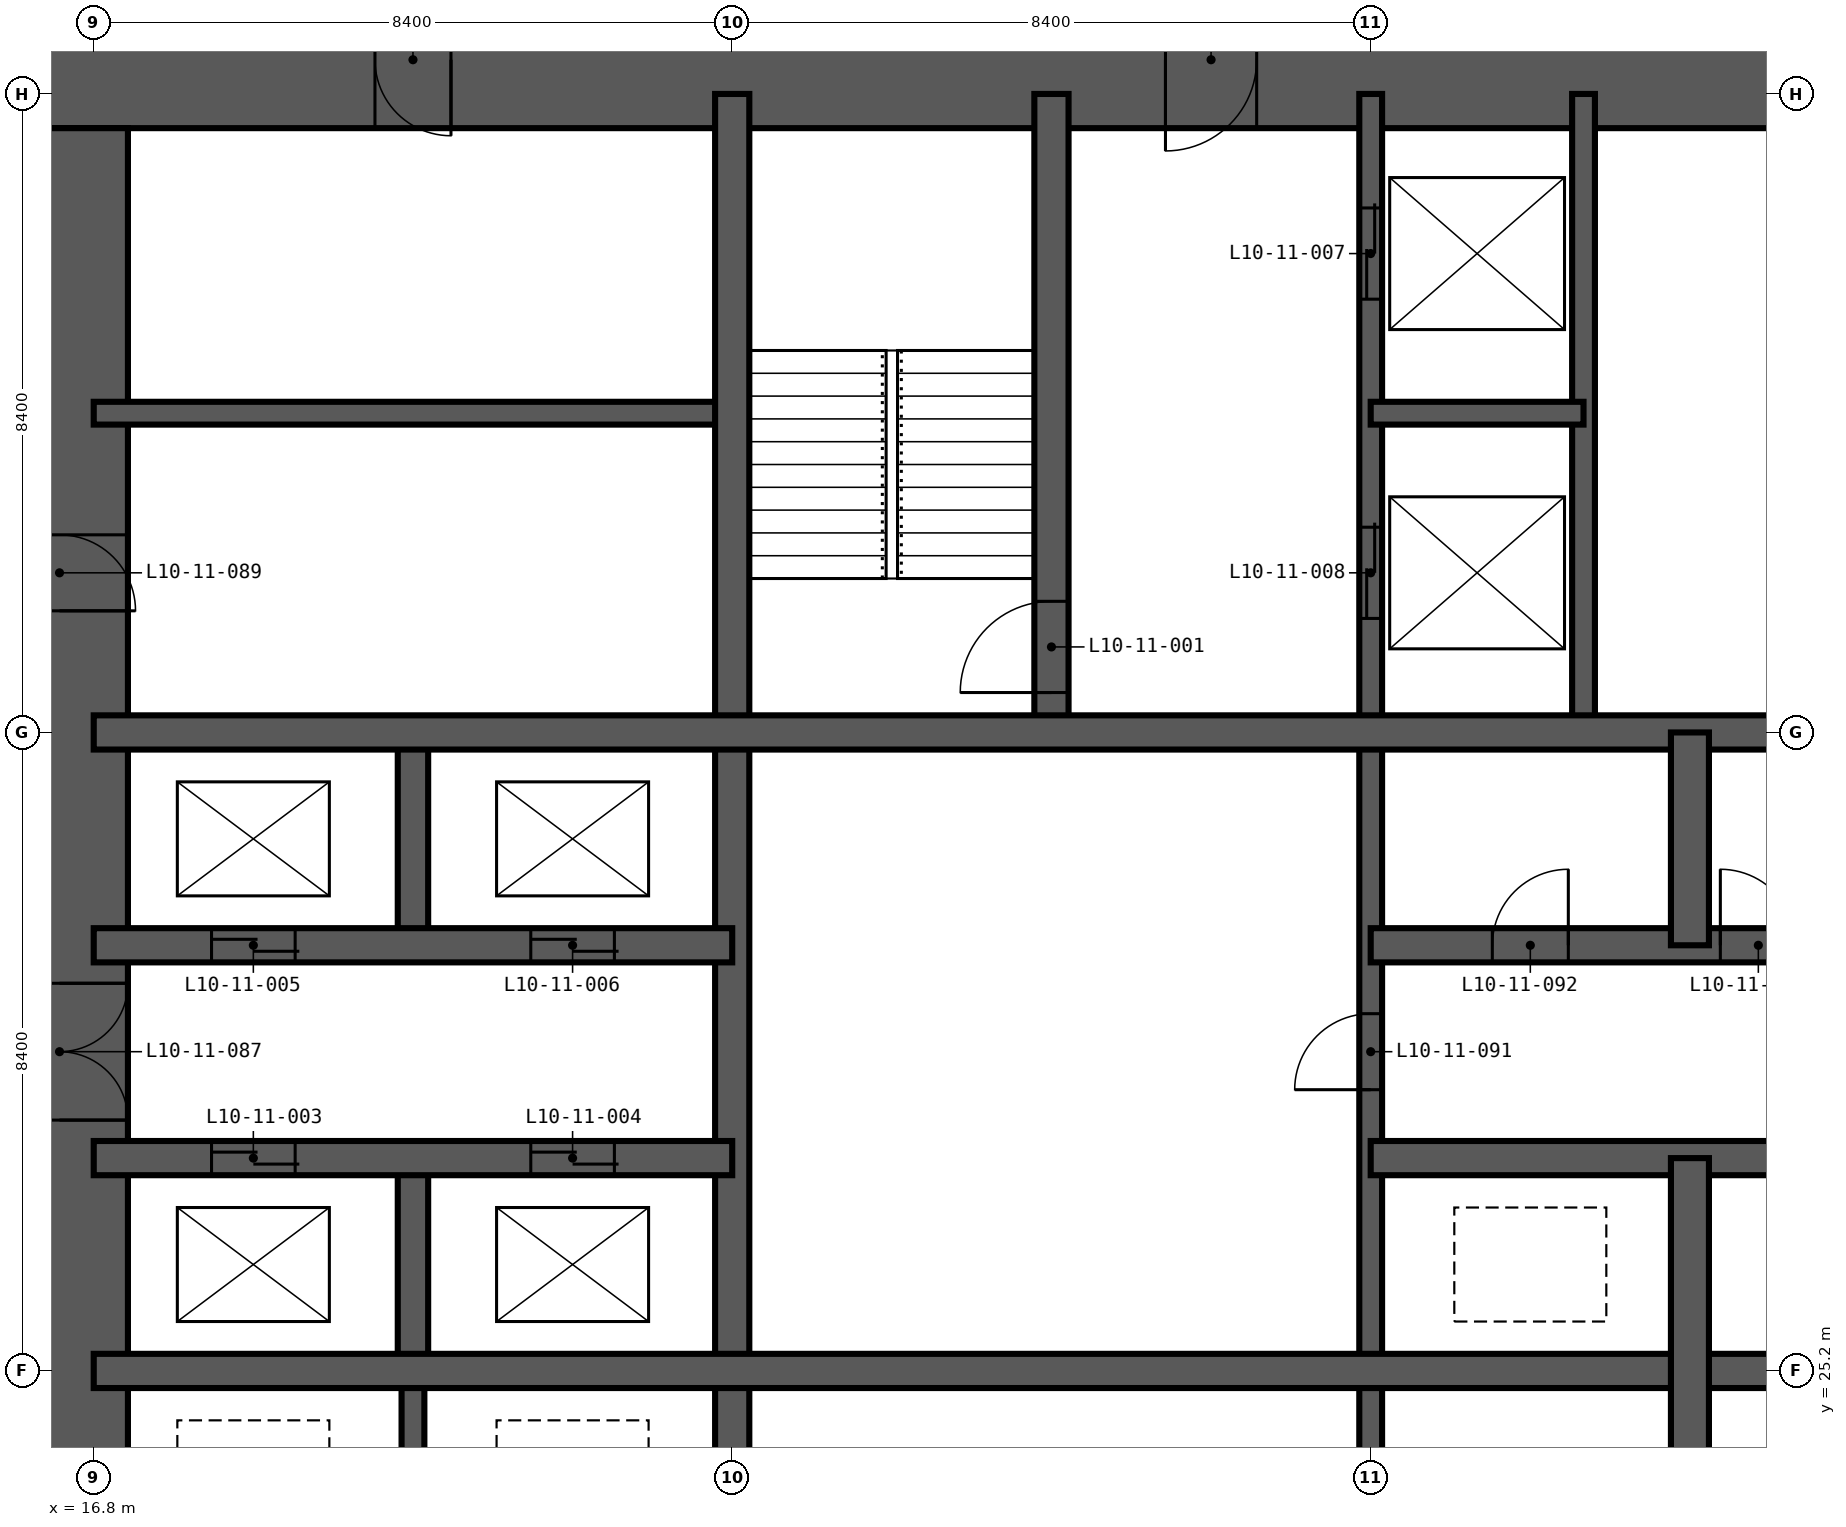
"""IFC4 building model, lengths in metres.
Left out: names, types, materials, properties, quantities, classifications, styles, units other than length and angle.
Written with IfcOpenShell. Run it as: python <this file> out.ifc"""

import sys

from ifc_helpers import new_model, si_unit, direction, frame, frame_2d, origin, place, context, subcontext, project, spatial, rectangle, extrude, element, fill, save


model = new_model("IFC4")
c1 = context("Model", 3, precision=1e-05, world=origin(), true_north=direction((0.0, 1.0)))
c2 = subcontext(c1, "Body", "Model", "MODEL_VIEW")
j1 = project(units=[si_unit("LENGTHUNIT", "METRE"), si_unit("PLANEANGLEUNIT", "RADIAN")], contexts=[c1])
p1 = place(None, origin())
s1 = spatial("IfcSite", under=j1, at=p1, CompositionType="ELEMENT")
p2 = place(p1, origin())
s2 = spatial("IfcBuilding", under=s1, at=p2, CompositionType="ELEMENT")
p3 = place(p2, frame((0.0, 0.0, 45.0)))
s3 = spatial("IfcBuildingStorey", under=s2, at=p3, CompositionType="ELEMENT", Elevation=45.0)
p4 = place(p3, frame((43.35, 42.45, -0.35), z_axis=(0.0, 0.0, 1.0), x_axis=(-1.0, 0.0, 0.0)))
e1 = element("IfcWall", 1, at=p4, inside=s3, PredefinedType="SHEAR", context=c2, shape_type="SweptSolid", body=[
    extrude(rectangle(XDim=27.9, YDim=1.8, at=frame_2d((13.95, 0.0))), origin(), (0.0, 0.0, 1.0), 3.6),
])
p5 = place(p4, frame((21.85, 0.0, 0.35)))
e2 = element("IfcOpeningElement", 2, at=p5, cuts=e1, PredefinedType="OPENING", context=c2, shape_type="SweptSolid", body=[
    extrude(rectangle(XDim=1.0, YDim=2.1, at=frame_2d((0.5, 1.05))), frame((0.0, 0.91, 0.0), z_axis=(0.0, -1.0, 0.0), x_axis=(1.0, 0.0, 0.0)), (0.0, 0.0, 1.0), 1.82),
])
p6 = place(p4, frame((11.25, 0.0, 0.35)))
e3 = element("IfcOpeningElement", 3, at=p6, cuts=e1, PredefinedType="OPENING", context=c2, shape_type="SweptSolid", body=[
    extrude(rectangle(XDim=1.2, YDim=2.2, at=frame_2d((0.6, 1.1))), frame((0.0, 0.91, 0.0), z_axis=(0.0, -1.0, 0.0), x_axis=(1.0, 0.0, 0.0)), (0.0, 0.0, 1.0), 1.82),
])
p7 = place(p3, frame((16.35, 41.55, -0.35), z_axis=(0.0, 0.0, 1.0), x_axis=(0.0, -1.0, 0.0)))
e4 = element("IfcWall", 4, at=p7, inside=s3, PredefinedType="SHEAR", context=c2, shape_type="SweptSolid", body=[
    extrude(rectangle(XDim=24.3, YDim=1.8, at=frame_2d((12.15, 0.0))), origin(), (0.0, 0.0, 1.0), 3.6),
])
p8 = place(p7, frame((11.25, 0.0, 0.35)))
e5 = element("IfcOpeningElement", 5, at=p8, cuts=e4, PredefinedType="OPENING", context=c2, shape_type="SweptSolid", body=[
    extrude(rectangle(XDim=1.8, YDim=2.2, at=frame_2d((0.9, 1.1))), frame((0.0, 0.91, 0.0), z_axis=(0.0, -1.0, 0.0), x_axis=(1.0, 0.0, 0.0)), (0.0, 0.0, 1.0), 1.82),
])
p9 = place(p7, frame((20.05, 0.0, 0.35)))
e6 = element("IfcOpeningElement", 6, at=p9, cuts=e4, PredefinedType="OPENING", context=c2, shape_type="SweptSolid", body=[
    extrude(rectangle(XDim=1.0, YDim=2.1, at=frame_2d((0.5, 1.05))), frame((0.0, 0.91, 0.0), z_axis=(0.0, -1.0, 0.0), x_axis=(1.0, 0.0, 0.0)), (0.0, 0.0, 1.0), 1.82),
])
p10 = place(p7, frame((5.35, 0.0, 0.35)))
e7 = element("IfcOpeningElement", 7, at=p10, cuts=e4, PredefinedType="OPENING", context=c2, shape_type="SweptSolid", body=[
    extrude(rectangle(XDim=1.0, YDim=2.1, at=frame_2d((0.5, 1.05))), frame((0.0, 0.91, 0.0), z_axis=(0.0, -1.0, 0.0), x_axis=(1.0, 0.0, 0.0)), (0.0, 0.0, 1.0), 1.82),
])
p11 = place(p3, frame((21.0, 22.4, -0.35), z_axis=(0.0, 0.0, 1.0), x_axis=(0.0, 1.0, 0.0)))
e8 = element("IfcWall", 8, at=p11, inside=s3, PredefinedType="SHEAR", context=c2, shape_type="SweptSolid", body=[
    extrude(rectangle(XDim=2.8, YDim=0.3, at=frame_2d((1.4, 0.0))), origin(), (0.0, 0.0, 1.0), 3.6),
])
p12 = place(p3, frame((33.6, 16.8, -0.35), z_axis=(0.0, 0.0, 1.0), x_axis=(0.0, 1.0, 0.0)))
e9 = element("IfcWall", 9, at=p12, inside=s3, PredefinedType="SHEAR", context=c2, shape_type="SweptSolid", body=[
    extrude(rectangle(XDim=25.2, YDim=0.3, at=frame_2d((12.6, 0.0))), origin(), (0.0, 0.0, 1.0), 3.6),
])
p13 = place(p12, frame((22.5, 0.0, 0.35)))
e10 = element("IfcOpeningElement", 10, at=p13, cuts=e9, PredefinedType="OPENING", context=c2, shape_type="SweptSolid", body=[
    extrude(rectangle(XDim=1.2, YDim=2.2, at=frame_2d((0.6, 1.1))), frame((0.0, 0.16, 0.0), z_axis=(0.0, -1.0, 0.0), x_axis=(1.0, 0.0, 0.0)), (0.0, 0.0, 1.0), 0.32),
])
p14 = place(p12, frame((18.3, 0.0, 0.35)))
e11 = element("IfcOpeningElement", 11, at=p14, cuts=e9, PredefinedType="OPENING", context=c2, shape_type="SweptSolid", body=[
    extrude(rectangle(XDim=1.2, YDim=2.2, at=frame_2d((0.6, 1.1))), frame((0.0, 0.16, 0.0), z_axis=(0.0, -1.0, 0.0), x_axis=(1.0, 0.0, 0.0)), (0.0, 0.0, 1.0), 0.32),
])
p15 = place(p12, frame((12.1, 0.0, 0.35)))
e12 = element("IfcOpeningElement", 12, at=p15, cuts=e9, PredefinedType="OPENING", context=c2, shape_type="SweptSolid", body=[
    extrude(rectangle(XDim=1.0, YDim=2.1, at=frame_2d((0.5, 1.05))), frame((0.0, 0.16, 0.0), z_axis=(0.0, -1.0, 0.0), x_axis=(1.0, 0.0, 0.0)), (0.0, 0.0, 1.0), 0.32),
])
for number, where, z_axis, x_axis in (
    (13, (36.4, 33.6, -0.35), (0.0, 0.0, 1.0), (0.0, 1.0, 0.0)),
    (14, (16.8, 37.8, -0.35), (0.0, 0.0, 1.0), (1.0, 0.0, 0.0)),
):
    element("IfcWall", number, at=place(p3, frame(where, z_axis=z_axis, x_axis=x_axis)), inside=s3, PredefinedType="SHEAR", context=c2, shape_type="SweptSolid", body=[
        extrude(rectangle(XDim=8.4, YDim=0.3, at=frame_2d((4.2, 0.0))), origin(), (0.0, 0.0, 1.0), 3.6),
    ])
p16 = place(p3, frame((33.6, 37.8, -0.35), z_axis=(0.0, 0.0, 1.0), x_axis=(1.0, 0.0, 0.0)))
e15 = element("IfcWall", 15, at=p16, inside=s3, PredefinedType="SHEAR", context=c2, shape_type="SweptSolid", body=[
    extrude(rectangle(XDim=2.8, YDim=0.3, at=frame_2d((1.4, 0.0))), origin(), (0.0, 0.0, 1.0), 3.6),
])
for number, where, z_axis, x_axis in (
    (16, (21.0, 25.2, -0.35), (0.0, 0.0, 1.0), (0.0, 1.0, 0.0)),
    (17, (21.0, 30.8, -0.35), (0.0, 0.0, 1.0), (0.0, 1.0, 0.0)),
):
    element("IfcWall", number, at=place(p3, frame(where, z_axis=z_axis, x_axis=x_axis)), inside=s3, PredefinedType="SHEAR", context=c2, shape_type="SweptSolid", body=[
        extrude(rectangle(XDim=2.8, YDim=0.4, at=frame_2d((1.4, 0.0))), origin(), (0.0, 0.0, 1.0), 3.6),
    ])
p17 = place(p3, frame((25.2, 16.8, -0.35), z_axis=(0.0, 0.0, 1.0), x_axis=(0.0, 1.0, 0.0)))
e18 = element("IfcWall", 18, at=p17, inside=s3, PredefinedType="SHEAR", context=c2, shape_type="SweptSolid", body=[
    extrude(rectangle(XDim=25.2, YDim=0.45, at=frame_2d((12.6, 0.0))), origin(), (0.0, 0.0, 1.0), 3.6),
])
p18 = place(p3, frame((29.4, 33.6, -0.35), z_axis=(0.0, 0.0, 1.0), x_axis=(0.0, 1.0, 0.0)))
e19 = element("IfcWall", 19, at=p18, inside=s3, PredefinedType="SHEAR", context=c2, shape_type="SweptSolid", body=[
    extrude(rectangle(XDim=8.4, YDim=0.45, at=frame_2d((4.2, 0.0))), origin(), (0.0, 0.0, 1.0), 3.6),
])
p19 = place(p18, frame((0.525, 0.0, 0.35)))
e20 = element("IfcOpeningElement", 20, at=p19, cuts=e19, PredefinedType="OPENING", context=c2, shape_type="SweptSolid", body=[
    extrude(rectangle(XDim=1.2, YDim=2.2, at=frame_2d((0.6, 1.1))), frame((0.0, 0.235, 0.0), z_axis=(0.0, -1.0, 0.0), x_axis=(1.0, 0.0, 0.0)), (0.0, 0.0, 1.0), 0.47),
])
p20 = place(p3, frame((16.8, 25.2, -0.35), z_axis=(0.0, 0.0, 1.0), x_axis=(1.0, 0.0, 0.0)))
e21 = element("IfcWall", 21, at=p20, inside=s3, PredefinedType="SHEAR", context=c2, shape_type="SweptSolid", body=[
    extrude(rectangle(XDim=25.2, YDim=0.45, at=frame_2d((12.6, 0.0))), origin(), (0.0, 0.0, 1.0), 3.6),
])
p21 = place(p3, frame((16.8, 28.0, -0.35), z_axis=(0.0, 0.0, 1.0), x_axis=(1.0, 0.0, 0.0)))
e22 = element("IfcWall", 22, at=p21, inside=s3, PredefinedType="SHEAR", context=c2, shape_type="SweptSolid", body=[
    extrude(rectangle(XDim=8.4, YDim=0.45, at=frame_2d((4.2, 0.0))), origin(), (0.0, 0.0, 1.0), 3.6),
])
p22 = place(p21, frame((1.55, 0.0, 0.35)))
e23 = element("IfcOpeningElement", 23, at=p22, cuts=e22, PredefinedType="OPENING", context=c2, shape_type="SweptSolid", body=[
    extrude(rectangle(XDim=1.1, YDim=2.2, at=frame_2d((0.55, 1.1))), frame((0.0, 0.235, 0.0), z_axis=(0.0, -1.0, 0.0), x_axis=(1.0, 0.0, 0.0)), (0.0, 0.0, 1.0), 0.47),
])
p23 = place(p21, frame((5.75, 0.0, 0.35)))
e24 = element("IfcOpeningElement", 24, at=p23, cuts=e22, PredefinedType="OPENING", context=c2, shape_type="SweptSolid", body=[
    extrude(rectangle(XDim=1.1, YDim=2.2, at=frame_2d((0.55, 1.1))), frame((0.0, 0.235, 0.0), z_axis=(0.0, -1.0, 0.0), x_axis=(1.0, 0.0, 0.0)), (0.0, 0.0, 1.0), 0.47),
])
p24 = place(p3, frame((33.6, 28.0, -0.35), z_axis=(0.0, 0.0, 1.0), x_axis=(1.0, 0.0, 0.0)))
e25 = element("IfcWall", 25, at=p24, inside=s3, PredefinedType="SHEAR", context=c2, shape_type="SweptSolid", body=[
    extrude(rectangle(XDim=8.4, YDim=0.45, at=frame_2d((4.2, 0.0))), origin(), (0.0, 0.0, 1.0), 3.6),
])
p25 = place(p3, frame((16.8, 30.8, -0.35), z_axis=(0.0, 0.0, 1.0), x_axis=(1.0, 0.0, 0.0)))
e26 = element("IfcWall", 26, at=p25, inside=s3, PredefinedType="SHEAR", context=c2, shape_type="SweptSolid", body=[
    extrude(rectangle(XDim=8.4, YDim=0.45, at=frame_2d((4.2, 0.0))), origin(), (0.0, 0.0, 1.0), 3.6),
])
p26 = place(p25, frame((1.55, 0.0, 0.35)))
e27 = element("IfcOpeningElement", 27, at=p26, cuts=e26, PredefinedType="OPENING", context=c2, shape_type="SweptSolid", body=[
    extrude(rectangle(XDim=1.1, YDim=2.2, at=frame_2d((0.55, 1.1))), frame((0.0, 0.235, 0.0), z_axis=(0.0, -1.0, 0.0), x_axis=(1.0, 0.0, 0.0)), (0.0, 0.0, 1.0), 0.47),
])
p27 = place(p25, frame((5.75, 0.0, 0.35)))
e28 = element("IfcOpeningElement", 28, at=p27, cuts=e26, PredefinedType="OPENING", context=c2, shape_type="SweptSolid", body=[
    extrude(rectangle(XDim=1.1, YDim=2.2, at=frame_2d((0.55, 1.1))), frame((0.0, 0.235, 0.0), z_axis=(0.0, -1.0, 0.0), x_axis=(1.0, 0.0, 0.0)), (0.0, 0.0, 1.0), 0.47),
])
p28 = place(p3, frame((33.6, 30.8, -0.35), z_axis=(0.0, 0.0, 1.0), x_axis=(1.0, 0.0, 0.0)))
e29 = element("IfcWall", 29, at=p28, inside=s3, PredefinedType="SHEAR", context=c2, shape_type="SweptSolid", body=[
    extrude(rectangle(XDim=8.4, YDim=0.45, at=frame_2d((4.2, 0.0))), origin(), (0.0, 0.0, 1.0), 3.6),
])
p29 = place(p28, frame((1.6, 0.0, 0.35)))
e30 = element("IfcOpeningElement", 30, at=p29, cuts=e29, PredefinedType="OPENING", context=c2, shape_type="SweptSolid", body=[
    extrude(rectangle(XDim=1.0, YDim=2.1, at=frame_2d((0.5, 1.05))), frame((0.0, 0.235, 0.0), z_axis=(0.0, -1.0, 0.0), x_axis=(1.0, 0.0, 0.0)), (0.0, 0.0, 1.0), 0.47),
])
p30 = place(p28, frame((4.6, 0.0, 0.35)))
e31 = element("IfcOpeningElement", 31, at=p30, cuts=e29, PredefinedType="OPENING", context=c2, shape_type="SweptSolid", body=[
    extrude(rectangle(XDim=1.0, YDim=2.1, at=frame_2d((0.5, 1.05))), frame((0.0, 0.235, 0.0), z_axis=(0.0, -1.0, 0.0), x_axis=(1.0, 0.0, 0.0)), (0.0, 0.0, 1.0), 0.47),
])
p31 = place(p3, frame((16.8, 33.6, -0.35), z_axis=(0.0, 0.0, 1.0), x_axis=(1.0, 0.0, 0.0)))
e32 = element("IfcWall", 32, at=p31, inside=s3, PredefinedType="SHEAR", context=c2, shape_type="SweptSolid", body=[
    extrude(rectangle(XDim=25.2, YDim=0.45, at=frame_2d((12.6, 0.0))), origin(), (0.0, 0.0, 1.0), 3.6),
])
p32 = place(p3, frame((37.8, 16.8, -0.35), z_axis=(0.0, 0.0, 1.0), x_axis=(0.0, 1.0, 0.0)))
e33 = element("IfcWall", 33, at=p32, inside=s3, PredefinedType="SHEAR", context=c2, shape_type="SweptSolid", body=[
    extrude(rectangle(XDim=11.2, YDim=0.5, at=frame_2d((5.6, 0.0))), origin(), (0.0, 0.0, 1.0), 3.6),
])
p33 = place(p3, frame((37.8, 30.8, -0.35), z_axis=(0.0, 0.0, 1.0), x_axis=(0.0, 1.0, 0.0)))
e34 = element("IfcWall", 34, at=p33, inside=s3, PredefinedType="SHEAR", context=c2, shape_type="SweptSolid", body=[
    extrude(rectangle(XDim=2.8, YDim=0.5, at=frame_2d((1.4, 0.0))), origin(), (0.0, 0.0, 1.0), 3.6),
])
p34 = place(p19, origin())
e35 = element("IfcDoor", 35, at=p34, inside=s3, OperationType="SINGLE_SWING_LEFT", PredefinedType="DOOR", context=c2, shape_type="SweptSolid", body=[
    extrude(rectangle(XDim=1.2, YDim=2.2, at=frame_2d((0.6, 1.1))), frame((0.0, 0.025, 0.0), z_axis=(0.0, -1.0, 0.0), x_axis=(1.0, 0.0, 0.0)), (0.0, 0.0, 1.0), 0.05),
])
fill(e20, e35)
p35 = place(p22, origin())
e36 = element("IfcDoor", 36, at=p35, inside=s3, OperationType="DOUBLE_DOOR_SLIDING", PredefinedType="DOOR", context=c2, shape_type="SweptSolid", body=[
    extrude(rectangle(XDim=1.1, YDim=2.2, at=frame_2d((0.55, 1.1))), frame((0.0, 0.025, 0.0), z_axis=(0.0, -1.0, 0.0), x_axis=(1.0, 0.0, 0.0)), (0.0, 0.0, 1.0), 0.05),
])
fill(e23, e36)
p36 = place(p23, origin())
e37 = element("IfcDoor", 37, at=p36, inside=s3, OperationType="DOUBLE_DOOR_SLIDING", PredefinedType="DOOR", context=c2, shape_type="SweptSolid", body=[
    extrude(rectangle(XDim=1.1, YDim=2.2, at=frame_2d((0.55, 1.1))), frame((0.0, 0.025, 0.0), z_axis=(0.0, -1.0, 0.0), x_axis=(1.0, 0.0, 0.0)), (0.0, 0.0, 1.0), 0.05),
])
fill(e24, e37)
p37 = place(p26, origin())
e38 = element("IfcDoor", 38, at=p37, inside=s3, OperationType="DOUBLE_DOOR_SLIDING", PredefinedType="DOOR", context=c2, shape_type="SweptSolid", body=[
    extrude(rectangle(XDim=1.1, YDim=2.2, at=frame_2d((0.55, 1.1))), frame((0.0, 0.025, 0.0), z_axis=(0.0, -1.0, 0.0), x_axis=(1.0, 0.0, 0.0)), (0.0, 0.0, 1.0), 0.05),
])
fill(e27, e38)
p38 = place(p27, origin())
e39 = element("IfcDoor", 39, at=p38, inside=s3, OperationType="DOUBLE_DOOR_SLIDING", PredefinedType="DOOR", context=c2, shape_type="SweptSolid", body=[
    extrude(rectangle(XDim=1.1, YDim=2.2, at=frame_2d((0.55, 1.1))), frame((0.0, 0.025, 0.0), z_axis=(0.0, -1.0, 0.0), x_axis=(1.0, 0.0, 0.0)), (0.0, 0.0, 1.0), 0.05),
])
fill(e28, e39)
p39 = place(p13, origin())
e40 = element("IfcDoor", 40, at=p39, inside=s3, OperationType="DOUBLE_DOOR_SLIDING", PredefinedType="DOOR", context=c2, shape_type="SweptSolid", body=[
    extrude(rectangle(XDim=1.2, YDim=2.2, at=frame_2d((0.6, 1.1))), frame((0.0, 0.025, 0.0), z_axis=(0.0, -1.0, 0.0), x_axis=(1.0, 0.0, 0.0)), (0.0, 0.0, 1.0), 0.05),
])
fill(e10, e40)
p40 = place(p14, origin())
e41 = element("IfcDoor", 41, at=p40, inside=s3, OperationType="DOUBLE_DOOR_SLIDING", PredefinedType="DOOR", context=c2, shape_type="SweptSolid", body=[
    extrude(rectangle(XDim=1.2, YDim=2.2, at=frame_2d((0.6, 1.1))), frame((0.0, 0.025, 0.0), z_axis=(0.0, -1.0, 0.0), x_axis=(1.0, 0.0, 0.0)), (0.0, 0.0, 1.0), 0.05),
])
fill(e11, e41)
p41 = place(p8, origin())
e42 = element("IfcDoor", 42, at=p41, inside=s3, OperationType="DOUBLE_DOOR_DOUBLE_SWING", PredefinedType="DOOR", context=c2, shape_type="SweptSolid", body=[
    extrude(rectangle(XDim=1.8, YDim=2.2, at=frame_2d((0.9, 1.1))), frame((0.0, 0.025, 0.0), z_axis=(0.0, -1.0, 0.0), x_axis=(1.0, 0.0, 0.0)), (0.0, 0.0, 1.0), 0.05),
])
fill(e5, e42)
p42 = place(p10, origin())
e43 = element("IfcDoor", 43, at=p42, inside=s3, OperationType="SINGLE_SWING_RIGHT", PredefinedType="DOOR", context=c2, shape_type="SweptSolid", body=[
    extrude(rectangle(XDim=1.0, YDim=2.1, at=frame_2d((0.5, 1.05))), frame((0.0, 0.025, 0.0), z_axis=(0.0, -1.0, 0.0), x_axis=(1.0, 0.0, 0.0)), (0.0, 0.0, 1.0), 0.05),
])
fill(e7, e43)
p43 = place(p5, origin())
e44 = element("IfcDoor", 44, at=p43, inside=s3, OperationType="SINGLE_SWING_LEFT", PredefinedType="DOOR", context=c2, shape_type="SweptSolid", body=[
    extrude(rectangle(XDim=1.0, YDim=2.1, at=frame_2d((0.5, 1.05))), frame((0.0, 0.025, 0.0), z_axis=(0.0, -1.0, 0.0), x_axis=(1.0, 0.0, 0.0)), (0.0, 0.0, 1.0), 0.05),
])
fill(e2, e44)
p44 = place(p15, origin())
e45 = element("IfcDoor", 45, at=p44, inside=s3, OperationType="SINGLE_SWING_LEFT", PredefinedType="DOOR", context=c2, shape_type="SweptSolid", body=[
    extrude(rectangle(XDim=1.0, YDim=2.1, at=frame_2d((0.5, 1.05))), frame((0.0, 0.025, 0.0), z_axis=(0.0, -1.0, 0.0), x_axis=(1.0, 0.0, 0.0)), (0.0, 0.0, 1.0), 0.05),
])
fill(e12, e45)
p45 = place(p29, origin())
e46 = element("IfcDoor", 46, at=p45, inside=s3, OperationType="SINGLE_SWING_RIGHT", PredefinedType="DOOR", context=c2, shape_type="SweptSolid", body=[
    extrude(rectangle(XDim=1.0, YDim=2.1, at=frame_2d((0.5, 1.05))), frame((0.0, 0.025, 0.0), z_axis=(0.0, -1.0, 0.0), x_axis=(1.0, 0.0, 0.0)), (0.0, 0.0, 1.0), 0.05),
])
fill(e30, e46)
p46 = place(p30, origin())
e47 = element("IfcDoor", 47, at=p46, inside=s3, OperationType="SINGLE_SWING_LEFT", PredefinedType="DOOR", context=c2, shape_type="SweptSolid", body=[
    extrude(rectangle(XDim=1.0, YDim=2.1, at=frame_2d((0.5, 1.05))), frame((0.0, 0.025, 0.0), z_axis=(0.0, -1.0, 0.0), x_axis=(1.0, 0.0, 0.0)), (0.0, 0.0, 1.0), 0.05),
])
fill(e31, e47)
p47 = place(p6, origin())
e48 = element("IfcDoor", 48, at=p47, inside=s3, OperationType="SINGLE_SWING_RIGHT", PredefinedType="DOOR", context=c2, shape_type="SweptSolid", body=[
    extrude(rectangle(XDim=1.2, YDim=2.2, at=frame_2d((0.6, 1.1))), frame((0.0, 0.025, 0.0), z_axis=(0.0, -1.0, 0.0), x_axis=(1.0, 0.0, 0.0)), (0.0, 0.0, 1.0), 0.05),
])
fill(e3, e48)
save(model, sys.argv[1])
